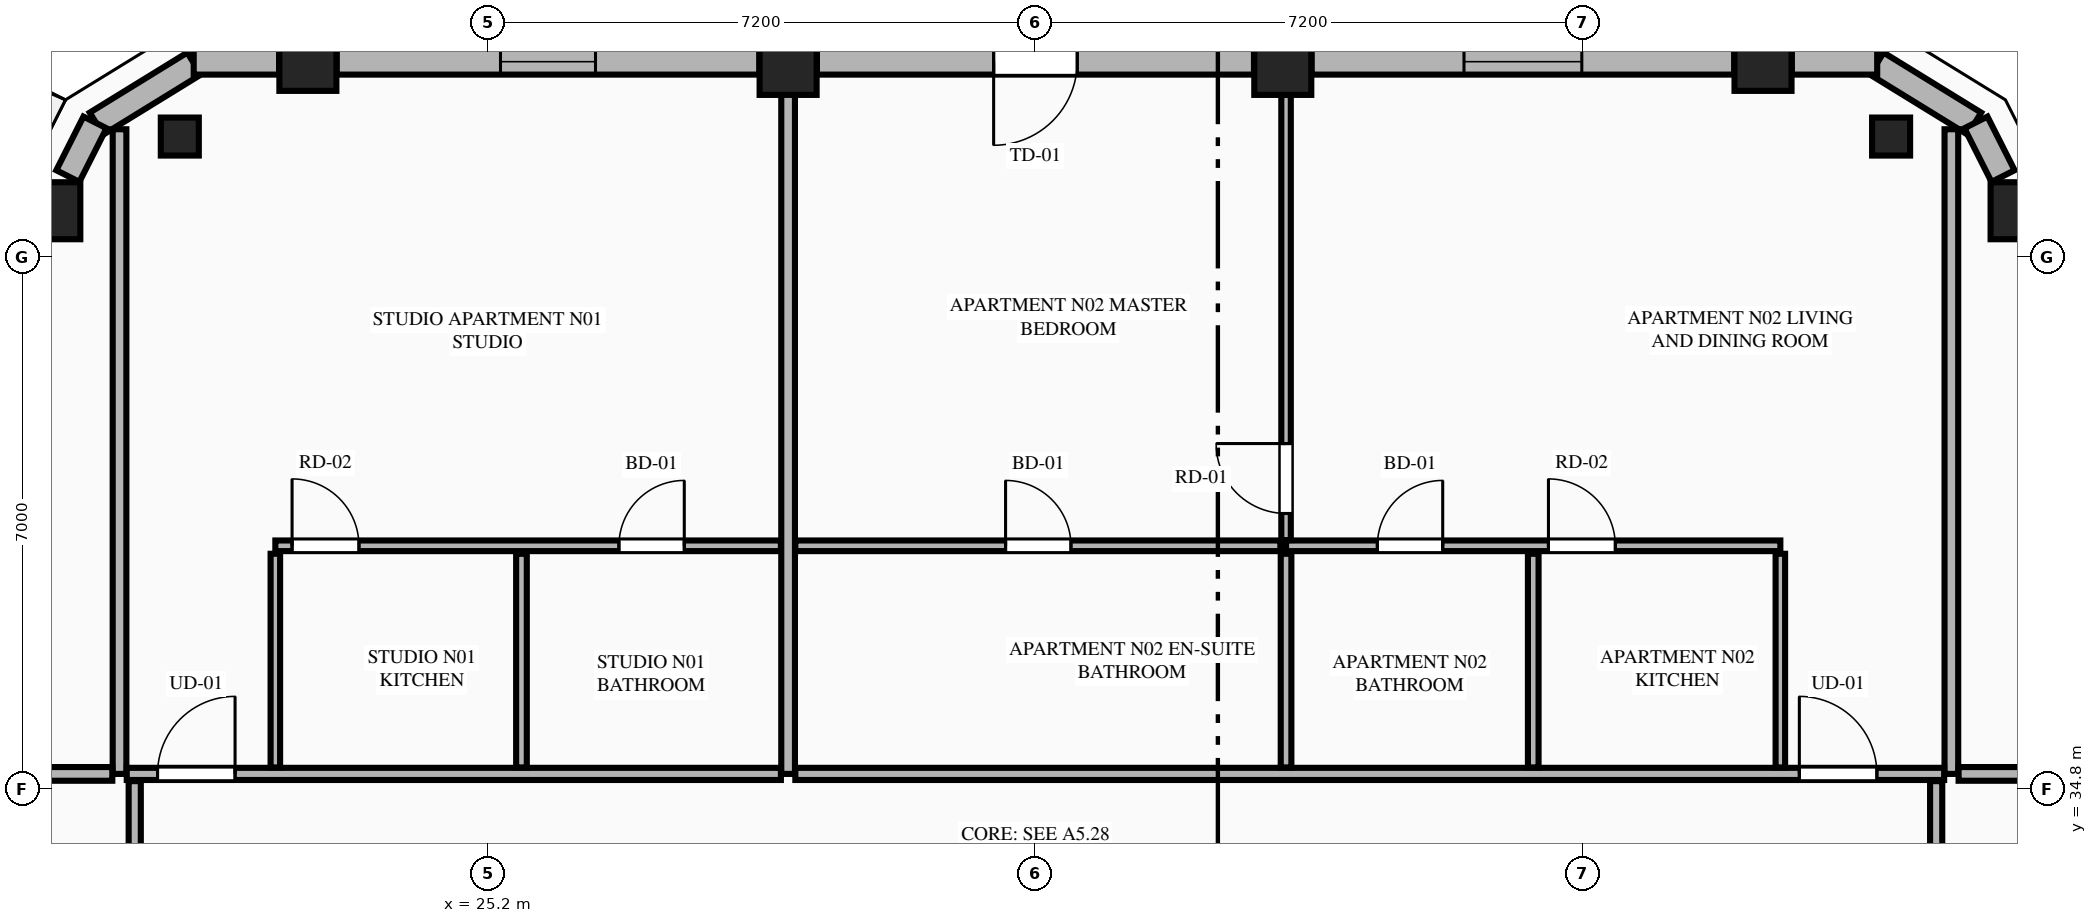
"""IFC4 building model, lengths in metres.
Left out: names, types, materials, properties, quantities, classifications, styles, units other than length and angle.
Written with IfcOpenShell. Run it as: python <this file> out.ifc"""

import sys

from ifc_helpers import new_model, si_unit, direction, frame, frame_2d, origin, origin_2d, place, context, subcontext, project, spatial, rectangle, extrude, element, fill, save


model = new_model("IFC4")
c1 = context("Model", 3, precision=1e-05, world=origin(), true_north=direction((0.0, 1.0)))
c2 = subcontext(c1, "Body", "Model", "MODEL_VIEW")
j1 = project(units=[si_unit("LENGTHUNIT", "METRE"), si_unit("PLANEANGLEUNIT", "RADIAN")], contexts=[c1])
p1 = place(None, origin())
s1 = spatial("IfcSite", under=j1, at=p1, CompositionType="ELEMENT")
p2 = place(p1, origin())
s2 = spatial("IfcBuilding", under=s1, at=p2, CompositionType="ELEMENT")
p3 = place(p2, frame((0.0, 0.0, 234.3)))
s3 = spatial("IfcBuildingStorey", under=s2, at=p3, CompositionType="ELEMENT", Elevation=234.3)
for number, where, z_axis, x_axis in (
    (1, (45.341, 42.409, 0.0), (0.0, 0.0, 1.0), (1.0, 0.0, 0.0)),
    (2, (41.972, 44.361, 0.0), (0.0, 0.0, 1.0), (1.0, 0.0, 0.0)),
    (3, (35.654, 44.308, 0.0), (0.0, 0.0, 1.0), (1.0, 0.0, 0.0)),
    (4, (29.146, 44.308, 0.0), (0.0, 0.0, 1.0), (1.0, 0.0, 0.0)),
    (5, (22.828, 44.361, 0.0), (0.0, 0.0, 1.0), (1.0, 0.0, 0.0)),
    (6, (19.459, 42.409, 0.0), (0.0, 0.0, 1.0), (1.0, 0.0, 0.0)),
):
    element("IfcColumn", number, at=place(p3, frame(where, z_axis=z_axis, x_axis=x_axis)), inside=s3, PredefinedType="COLUMN", context=c2, shape_type="SweptSolid", body=[
        extrude(rectangle(XDim=0.75, YDim=0.75, at=origin_2d()), origin(), (0.0, 0.0, 1.0), 3.65),
    ])
for number, where, z_axis, x_axis in (
    (7, (43.657, 43.385, 0.0), (0.0, 0.0, 1.0), (-0.865, 0.501, 0.0)),
    (8, (21.143, 43.385, 0.0), (0.0, 0.0, 1.0), (-0.865, -0.501, 0.0)),
):
    element("IfcColumn", number, at=place(p3, frame(where, z_axis=z_axis, x_axis=x_axis)), inside=s3, PredefinedType="PILASTER", context=c2, shape_type="SweptSolid", body=[
        extrude(rectangle(XDim=0.5, YDim=0.35, at=origin_2d()), origin(), (0.0, 0.0, 1.0), 3.65),
    ])
for number, where, z_axis, x_axis in (
    (9, (44.753, 43.555, 0.0), (0.0, 0.0, 1.0), (-0.852, 0.524, 0.0)),
    (10, (21.331, 44.345, 0.0), (0.0, 0.0, 1.0), (-0.852, -0.524, 0.0)),
):
    element("IfcWall", number, at=place(p3, frame(where, z_axis=z_axis, x_axis=x_axis)), inside=s3, PredefinedType="STANDARD", context=c2, shape_type="SweptSolid", body=[
        extrude(rectangle(XDim=1.508, YDim=0.34, at=frame_2d((0.754, 0.0))), origin(), (0.0, 0.0, 1.0), 3.45),
    ])
p4 = place(p3, frame((45.13, 42.865, 0.0), z_axis=(0.0, 0.0, 1.0), x_axis=(-0.451159191899, 0.892443490404, 0.0)))
e11 = element("IfcWall", 11, at=p4, inside=s3, PredefinedType="STANDARD", context=c2, shape_type="SweptSolid", body=[
    extrude(rectangle(XDim=0.791, YDim=0.34, at=frame_2d((0.396, 0.0))), origin(), (0.0, 0.0, 1.0), 3.45),
])
p5 = place(p3, frame((43.474, 44.37, 0.0), z_axis=(0.0, 0.0, 1.0), x_axis=(-1.0, 0.0, 0.0)))
e12 = element("IfcWall", 12, at=p5, inside=s3, PredefinedType="STANDARD", context=c2, shape_type="SweptSolid", body=[
    extrude(rectangle(XDim=1.123, YDim=0.34, at=frame_2d((0.562, 0.0))), origin(), (0.0, 0.0, 1.0), 3.45),
])
p6 = place(p3, frame((41.593, 44.37, 0.0), z_axis=(0.0, 0.0, 1.0), x_axis=(-1.0, 0.0, 0.0)))
e13 = element("IfcWall", 13, at=p6, inside=s3, PredefinedType="STANDARD", context=c2, shape_type="SweptSolid", body=[
    extrude(rectangle(XDim=5.56, YDim=0.34, at=frame_2d((2.78, 0.0))), origin(), (0.0, 0.0, 1.0), 2.983),
])
p7 = place(p6, frame((2.005, 0.0, 0.75)))
e14 = element("IfcOpeningElement", 14, at=p7, cuts=e13, PredefinedType="OPENING", context=c2, shape_type="SweptSolid", body=[
    extrude(rectangle(XDim=1.55, YDim=2.05, at=frame_2d((0.775, 1.025))), frame((0.0, 0.18, 0.0), z_axis=(0.0, -1.0, 0.0), x_axis=(1.0, 0.0, 0.0)), (0.0, 0.0, 1.0), 0.36),
])
p8 = place(p3, frame((35.275, 44.37, 0.0), z_axis=(0.0, 0.0, 1.0), x_axis=(-1.0, 0.0, 0.0)))
e15 = element("IfcWall", 15, at=p8, inside=s3, PredefinedType="STANDARD", context=c2, shape_type="SweptSolid", body=[
    extrude(rectangle(XDim=5.75, YDim=0.34, at=frame_2d((2.875, 0.0))), origin(), (0.0, 0.0, 1.0), 2.983),
])
p9 = place(p8, frame((2.325, 0.0, 0.0)))
e16 = element("IfcOpeningElement", 16, at=p9, cuts=e15, PredefinedType="OPENING", context=c2, shape_type="SweptSolid", body=[
    extrude(rectangle(XDim=1.1, YDim=2.25, at=frame_2d((0.55, 1.125))), frame((0.0, 0.18, 0.0), z_axis=(0.0, -1.0, 0.0), x_axis=(1.0, 0.0, 0.0)), (0.0, 0.0, 1.0), 0.36),
])
p10 = place(p3, frame((28.767, 44.37, 0.0), z_axis=(0.0, 0.0, 1.0), x_axis=(-1.0, 0.0, 0.0)))
e17 = element("IfcWall", 17, at=p10, inside=s3, PredefinedType="STANDARD", context=c2, shape_type="SweptSolid", body=[
    extrude(rectangle(XDim=5.56, YDim=0.34, at=frame_2d((2.78, 0.0))), origin(), (0.0, 0.0, 1.0), 2.983),
])
p11 = place(p10, frame((2.155, 0.0, 0.75)))
e18 = element("IfcOpeningElement", 18, at=p11, cuts=e17, PredefinedType="OPENING", context=c2, shape_type="SweptSolid", body=[
    extrude(rectangle(XDim=1.25, YDim=1.95, at=frame_2d((0.625, 0.975))), frame((0.0, 0.18, 0.0), z_axis=(0.0, -1.0, 0.0), x_axis=(1.0, 0.0, 0.0)), (0.0, 0.0, 1.0), 0.36),
])
p12 = place(p3, frame((22.449, 44.37, 0.0), z_axis=(0.0, 0.0, 1.0), x_axis=(-1.0, 0.0, 0.0)))
e19 = element("IfcWall", 19, at=p12, inside=s3, PredefinedType="STANDARD", context=c2, shape_type="SweptSolid", body=[
    extrude(rectangle(XDim=1.123, YDim=0.34, at=frame_2d((0.562, 0.0))), origin(), (0.0, 0.0, 1.0), 3.45),
])
p13 = place(p3, frame((20.027, 43.571, 0.0), z_axis=(0.0, 0.0, 1.0), x_axis=(-0.451404919072, -0.89231922485, 0.0)))
e20 = element("IfcWall", 20, at=p13, inside=s3, PredefinedType="STANDARD", context=c2, shape_type="SweptSolid", body=[
    extrude(rectangle(XDim=0.791, YDim=0.34, at=frame_2d((0.396, 0.0))), origin(), (0.0, 0.0, 1.0), 3.45),
])
p14 = place(p3, frame((20.35, 35.0, 0.0), z_axis=(0.0, 0.0, 1.0), x_axis=(0.0, 1.0, 0.0)))
e21 = element("IfcWall", 21, at=p14, inside=s3, PredefinedType="PARTITIONING", context=c2, shape_type="SweptSolid", body=[
    extrude(rectangle(XDim=8.481, YDim=0.18, at=frame_2d((4.24, 0.0))), origin(), (0.0, 0.0, 1.0), 3.45),
])
p15 = place(p3, frame((29.146, 35.0, 0.0), z_axis=(0.0, 0.0, 1.0), x_axis=(0.0, 1.0, 0.0)))
e22 = element("IfcWall", 22, at=p15, inside=s3, PredefinedType="PARTITIONING", context=c2, shape_type="SweptSolid", body=[
    extrude(rectangle(XDim=9.195, YDim=0.18, at=frame_2d((4.598, 0.0))), origin(), (0.0, 0.0, 1.0), 2.907),
])
p16 = place(p3, frame((44.45, 35.0, 0.0), z_axis=(0.0, 0.0, 1.0), x_axis=(0.0, 1.0, 0.0)))
e23 = element("IfcWall", 23, at=p16, inside=s3, PredefinedType="PARTITIONING", context=c2, shape_type="SweptSolid", body=[
    extrude(rectangle(XDim=8.481, YDim=0.18, at=frame_2d((4.24, 0.0))), origin(), (0.0, 0.0, 1.0), 3.45),
])
p17 = place(p3, frame((20.445, 35.0, 0.0), z_axis=(0.0, 0.0, 1.0), x_axis=(1.0, 0.0, 0.0)))
e24 = element("IfcWall", 24, at=p17, inside=s3, PredefinedType="PARTITIONING", context=c2, shape_type="SweptSolid", body=[
    extrude(rectangle(XDim=8.606, YDim=0.16, at=frame_2d((4.303, 0.0))), origin(), (0.0, 0.0, 1.0), 3.45),
])
p18 = place(p17, frame((0.405, 0.0, 0.0)))
e25 = element("IfcOpeningElement", 25, at=p18, cuts=e24, PredefinedType="OPENING", context=c2, shape_type="SweptSolid", body=[
    extrude(rectangle(XDim=1.02, YDim=2.25, at=frame_2d((0.51, 1.125))), frame((0.0, 0.09, 0.0), z_axis=(0.0, -1.0, 0.0), x_axis=(1.0, 0.0, 0.0)), (0.0, 0.0, 1.0), 0.18),
])
p19 = place(p3, frame((22.4, 35.085, 0.0), z_axis=(0.0, 0.0, 1.0), x_axis=(0.0, 1.0, 0.0)))
e26 = element("IfcWall", 26, at=p19, inside=s3, PredefinedType="PARTITIONING", context=c2, shape_type="SweptSolid", body=[
    extrude(rectangle(XDim=2.811, YDim=0.125, at=frame_2d((1.406, 0.0))), origin(), (0.0, 0.0, 1.0), 3.45),
])
p20 = place(p3, frame((22.4, 38.001, 0.0), z_axis=(0.0, 0.0, 1.0), x_axis=(1.0, 0.0, 0.0)))
e27 = element("IfcWall", 27, at=p20, inside=s3, PredefinedType="PLUMBINGWALL", context=c2, shape_type="SweptSolid", body=[
    extrude(rectangle(XDim=6.651, YDim=0.14, at=frame_2d((3.326, 0.0))), origin(), (0.0, 0.0, 1.0), 3.45),
])
p21 = place(p20, frame((4.52, 0.0, 0.0)))
e28 = element("IfcOpeningElement", 28, at=p21, cuts=e27, PredefinedType="OPENING", context=c2, shape_type="SweptSolid", body=[
    extrude(rectangle(XDim=0.86, YDim=2.1, at=frame_2d((0.43, 1.05))), frame((0.0, 0.08, 0.0), z_axis=(0.0, -1.0, 0.0), x_axis=(1.0, 0.0, 0.0)), (0.0, 0.0, 1.0), 0.16),
])
p22 = place(p20, frame((0.22, 0.0, 0.0)))
e29 = element("IfcOpeningElement", 29, at=p22, cuts=e27, PredefinedType="OPENING", context=c2, shape_type="SweptSolid", body=[
    extrude(rectangle(XDim=0.88, YDim=2.15, at=frame_2d((0.44, 1.075))), frame((0.0, 0.08, 0.0), z_axis=(0.0, -1.0, 0.0), x_axis=(1.0, 0.0, 0.0)), (0.0, 0.0, 1.0), 0.16),
])
p23 = place(p3, frame((25.638, 35.085, 0.0), z_axis=(0.0, 0.0, 1.0), x_axis=(0.0, 1.0, 0.0)))
e30 = element("IfcWall", 30, at=p23, inside=s3, PredefinedType="PLUMBINGWALL", context=c2, shape_type="SweptSolid", body=[
    extrude(rectangle(XDim=2.811, YDim=0.14, at=frame_2d((1.406, 0.0))), origin(), (0.0, 0.0, 1.0), 3.45),
])
p24 = place(p3, frame((29.241, 35.0, 0.0), z_axis=(0.0, 0.0, 1.0), x_axis=(1.0, 0.0, 0.0)))
e31 = element("IfcWall", 31, at=p24, inside=s3, PredefinedType="PARTITIONING", context=c2, shape_type="SweptSolid", body=[
    extrude(rectangle(XDim=15.114, YDim=0.16, at=frame_2d((7.557, 0.0))), origin(), (0.0, 0.0, 1.0), 3.45),
])
p25 = place(p24, frame((13.209, 0.0, 0.0)))
e32 = element("IfcOpeningElement", 32, at=p25, cuts=e31, PredefinedType="OPENING", context=c2, shape_type="SweptSolid", body=[
    extrude(rectangle(XDim=1.02, YDim=2.25, at=frame_2d((0.51, 1.125))), frame((0.0, 0.09, 0.0), z_axis=(0.0, -1.0, 0.0), x_axis=(1.0, 0.0, 0.0)), (0.0, 0.0, 1.0), 0.18),
])
p26 = place(p3, frame((42.2, 35.085, 0.0), z_axis=(0.0, 0.0, 1.0), x_axis=(0.0, 1.0, 0.0)))
e33 = element("IfcWall", 33, at=p26, inside=s3, PredefinedType="PARTITIONING", context=c2, shape_type="SweptSolid", body=[
    extrude(rectangle(XDim=2.811, YDim=0.125, at=frame_2d((1.406, 0.0))), origin(), (0.0, 0.0, 1.0), 3.45),
])
p27 = place(p3, frame((35.697, 38.001, 0.0), z_axis=(0.0, 0.0, 1.0), x_axis=(1.0, 0.0, 0.0)))
e34 = element("IfcWall", 34, at=p27, inside=s3, PredefinedType="PLUMBINGWALL", context=c2, shape_type="SweptSolid", body=[
    extrude(rectangle(XDim=6.503, YDim=0.14, at=frame_2d((3.251, 0.0))), origin(), (0.0, 0.0, 1.0), 3.45),
])
p28 = place(p27, frame((1.201, 0.0, 0.0)))
e35 = element("IfcOpeningElement", 35, at=p28, cuts=e34, PredefinedType="OPENING", context=c2, shape_type="SweptSolid", body=[
    extrude(rectangle(XDim=0.86, YDim=2.1, at=frame_2d((0.43, 1.05))), frame((0.0, 0.08, 0.0), z_axis=(0.0, -1.0, 0.0), x_axis=(1.0, 0.0, 0.0)), (0.0, 0.0, 1.0), 0.16),
])
p29 = place(p27, frame((3.452, 0.0, 0.0)))
e36 = element("IfcOpeningElement", 36, at=p29, cuts=e34, PredefinedType="OPENING", context=c2, shape_type="SweptSolid", body=[
    extrude(rectangle(XDim=0.88, YDim=2.15, at=frame_2d((0.44, 1.075))), frame((0.0, 0.08, 0.0), z_axis=(0.0, -1.0, 0.0), x_axis=(1.0, 0.0, 0.0)), (0.0, 0.0, 1.0), 0.16),
])
p30 = place(p3, frame((29.241, 38.001, 0.0), z_axis=(0.0, 0.0, 1.0), x_axis=(1.0, 0.0, 0.0)))
e37 = element("IfcWall", 37, at=p30, inside=s3, PredefinedType="PLUMBINGWALL", context=c2, shape_type="SweptSolid", body=[
    extrude(rectangle(XDim=6.381, YDim=0.14, at=frame_2d((3.19, 0.0))), origin(), (0.0, 0.0, 1.0), 3.45),
])
p31 = place(p30, frame((2.766, 0.0, 0.0)))
e38 = element("IfcOpeningElement", 38, at=p31, cuts=e37, PredefinedType="OPENING", context=c2, shape_type="SweptSolid", body=[
    extrude(rectangle(XDim=0.86, YDim=2.1, at=frame_2d((0.43, 1.05))), frame((0.0, 0.08, 0.0), z_axis=(0.0, -1.0, 0.0), x_axis=(1.0, 0.0, 0.0)), (0.0, 0.0, 1.0), 0.16),
])
p32 = place(p3, frame((38.949, 35.085, 0.0), z_axis=(0.0, 0.0, 1.0), x_axis=(0.0, 1.0, 0.0)))
e39 = element("IfcWall", 39, at=p32, inside=s3, PredefinedType="PLUMBINGWALL", context=c2, shape_type="SweptSolid", body=[
    extrude(rectangle(XDim=2.811, YDim=0.14, at=frame_2d((1.406, 0.0))), origin(), (0.0, 0.0, 1.0), 3.45),
])
p33 = place(p3, frame((35.697, 35.085, 0.0), z_axis=(0.0, 0.0, 1.0), x_axis=(0.0, 1.0, 0.0)))
e40 = element("IfcWall", 40, at=p33, inside=s3, PredefinedType="PLUMBINGWALL", context=c2, shape_type="SweptSolid", body=[
    extrude(rectangle(XDim=2.811, YDim=0.14, at=frame_2d((1.406, 0.0))), origin(), (0.0, 0.0, 1.0), 2.907),
])
p34 = place(p3, frame((35.697, 38.076, 0.0), z_axis=(0.0, 0.0, 1.0), x_axis=(0.0, 1.0, 0.0)))
e41 = element("IfcWall", 41, at=p34, inside=s3, PredefinedType="PARTITIONING", context=c2, shape_type="SweptSolid", body=[
    extrude(rectangle(XDim=6.209, YDim=0.125, at=frame_2d((3.104, 0.0))), origin(), (0.0, 0.0, 1.0), 2.907),
])
p35 = place(p34, frame((0.35, 0.0, 0.0)))
e42 = element("IfcOpeningElement", 42, at=p35, cuts=e41, PredefinedType="OPENING", context=c2, shape_type="SweptSolid", body=[
    extrude(rectangle(XDim=0.92, YDim=2.15, at=frame_2d((0.46, 1.075))), frame((0.0, 0.073, 0.0), z_axis=(0.0, -1.0, 0.0), x_axis=(1.0, 0.0, 0.0)), (0.0, 0.0, 1.0), 0.145),
])
p36 = place(p3, frame((15.933, 35.0, 0.0), z_axis=(0.0, 0.0, 1.0), x_axis=(1.0, 0.0, 0.0)))
e43 = element("IfcWall", 43, at=p36, inside=s3, PredefinedType="PARTITIONING", context=c2, shape_type="SweptSolid", body=[
    extrude(rectangle(XDim=4.322, YDim=0.18, at=frame_2d((2.161, 0.0))), origin(), (0.0, 0.0, 1.0), 3.45),
])
p37 = place(p3, frame((44.545, 35.0, 0.0), z_axis=(0.0, 0.0, 1.0), x_axis=(1.0, 0.0, 0.0)))
e44 = element("IfcWall", 44, at=p37, inside=s3, PredefinedType="PARTITIONING", context=c2, shape_type="SweptSolid", body=[
    extrude(rectangle(XDim=4.322, YDim=0.18, at=frame_2d((2.161, 0.0))), origin(), (0.0, 0.0, 1.0), 3.45),
])
p38 = place(p3, frame((20.55, 16.495, 0.0), z_axis=(0.0, 0.0, 1.0), x_axis=(0.0, 1.0, 0.0)))
e45 = element("IfcWall", 45, at=p38, inside=s3, PredefinedType="PARTITIONING", context=c2, shape_type="SweptSolid", body=[
    extrude(rectangle(XDim=18.41, YDim=0.16, at=frame_2d((9.205, 0.0))), origin(), (0.0, 0.0, 1.0), 3.137),
])
p39 = place(p38, frame((0.45, 0.0, 0.0)))
e46 = element("IfcOpeningElement", 46, at=p39, cuts=e45, PredefinedType="OPENING", context=c2, shape_type="SweptSolid", body=[
    extrude(rectangle(XDim=1.02, YDim=2.25, at=frame_2d((0.51, 1.125))), frame((0.0, 0.09, 0.0), z_axis=(0.0, -1.0, 0.0), x_axis=(1.0, 0.0, 0.0)), (0.0, 0.0, 1.0), 0.18),
])
p40 = place(p3, frame((44.25, 16.495, 0.0), z_axis=(0.0, 0.0, 1.0), x_axis=(0.0, 1.0, 0.0)))
e47 = element("IfcWall", 47, at=p40, inside=s3, PredefinedType="PARTITIONING", context=c2, shape_type="SweptSolid", body=[
    extrude(rectangle(XDim=18.41, YDim=0.16, at=frame_2d((9.205, 0.0))), origin(), (0.0, 0.0, 1.0), 3.137),
])
p41 = place(p40, frame((0.45, 0.0, 0.0)))
e48 = element("IfcOpeningElement", 48, at=p41, cuts=e47, PredefinedType="OPENING", context=c2, shape_type="SweptSolid", body=[
    extrude(rectangle(XDim=1.02, YDim=2.25, at=frame_2d((0.51, 1.125))), frame((0.0, 0.09, 0.0), z_axis=(0.0, -1.0, 0.0), x_axis=(1.0, 0.0, 0.0)), (0.0, 0.0, 1.0), 0.18),
])
p42 = place(p7, origin())
e49 = element("IfcWindow", 49, at=p42, inside=s3, PartitioningType="SINGLE_PANEL", PredefinedType="WINDOW", context=c2, shape_type="SweptSolid", body=[
    extrude(rectangle(XDim=1.55, YDim=2.05, at=frame_2d((0.775, 1.025))), frame((0.0, 0.03, 0.0), z_axis=(0.0, -1.0, 0.0), x_axis=(1.0, 0.0, 0.0)), (0.0, 0.0, 1.0), 0.06),
])
fill(e14, e49)
p43 = place(p9, origin())
e50 = element("IfcDoor", 50, at=p43, inside=s3, OperationType="SINGLE_SWING_RIGHT", PredefinedType="DOOR", context=c2, shape_type="SweptSolid", body=[
    extrude(rectangle(XDim=1.1, YDim=2.25, at=frame_2d((0.55, 1.125))), frame((0.0, 0.025, 0.0), z_axis=(0.0, -1.0, 0.0), x_axis=(1.0, 0.0, 0.0)), (0.0, 0.0, 1.0), 0.05),
])
fill(e16, e50)
p44 = place(p11, origin())
e51 = element("IfcWindow", 51, at=p44, inside=s3, PartitioningType="SINGLE_PANEL", PredefinedType="WINDOW", context=c2, shape_type="SweptSolid", body=[
    extrude(rectangle(XDim=1.25, YDim=1.95, at=frame_2d((0.625, 0.975))), frame((0.0, 0.03, 0.0), z_axis=(0.0, -1.0, 0.0), x_axis=(1.0, 0.0, 0.0)), (0.0, 0.0, 1.0), 0.06),
])
fill(e18, e51)
p45 = place(p21, origin())
e52 = element("IfcDoor", 52, at=p45, inside=s3, OperationType="SINGLE_SWING_RIGHT", PredefinedType="DOOR", context=c2, shape_type="SweptSolid", body=[
    extrude(rectangle(XDim=0.86, YDim=2.1, at=frame_2d((0.43, 1.05))), frame((0.0, 0.025, 0.0), z_axis=(0.0, -1.0, 0.0), x_axis=(1.0, 0.0, 0.0)), (0.0, 0.0, 1.0), 0.05),
])
fill(e28, e52)
p46 = place(p18, origin())
e53 = element("IfcDoor", 53, at=p46, inside=s3, OperationType="SINGLE_SWING_RIGHT", PredefinedType="DOOR", context=c2, shape_type="SweptSolid", body=[
    extrude(rectangle(XDim=1.02, YDim=2.25, at=frame_2d((0.51, 1.125))), frame((0.0, 0.025, 0.0), z_axis=(0.0, -1.0, 0.0), x_axis=(1.0, 0.0, 0.0)), (0.0, 0.0, 1.0), 0.05),
])
fill(e25, e53)
p47 = place(p22, origin())
e54 = element("IfcDoor", 54, at=p47, inside=s3, OperationType="SINGLE_SWING_LEFT", PredefinedType="DOOR", context=c2, shape_type="SweptSolid", body=[
    extrude(rectangle(XDim=0.88, YDim=2.15, at=frame_2d((0.44, 1.075))), frame((0.0, 0.025, 0.0), z_axis=(0.0, -1.0, 0.0), x_axis=(1.0, 0.0, 0.0)), (0.0, 0.0, 1.0), 0.05),
])
fill(e29, e54)
p48 = place(p28, origin())
e55 = element("IfcDoor", 55, at=p48, inside=s3, OperationType="SINGLE_SWING_RIGHT", PredefinedType="DOOR", context=c2, shape_type="SweptSolid", body=[
    extrude(rectangle(XDim=0.86, YDim=2.1, at=frame_2d((0.43, 1.05))), frame((0.0, 0.025, 0.0), z_axis=(0.0, -1.0, 0.0), x_axis=(1.0, 0.0, 0.0)), (0.0, 0.0, 1.0), 0.05),
])
fill(e35, e55)
p49 = place(p31, origin())
e56 = element("IfcDoor", 56, at=p49, inside=s3, OperationType="SINGLE_SWING_LEFT", PredefinedType="DOOR", context=c2, shape_type="SweptSolid", body=[
    extrude(rectangle(XDim=0.86, YDim=2.1, at=frame_2d((0.43, 1.05))), frame((0.0, 0.025, 0.0), z_axis=(0.0, -1.0, 0.0), x_axis=(1.0, 0.0, 0.0)), (0.0, 0.0, 1.0), 0.05),
])
fill(e38, e56)
p50 = place(p25, origin())
e57 = element("IfcDoor", 57, at=p50, inside=s3, OperationType="SINGLE_SWING_LEFT", PredefinedType="DOOR", context=c2, shape_type="SweptSolid", body=[
    extrude(rectangle(XDim=1.02, YDim=2.25, at=frame_2d((0.51, 1.125))), frame((0.0, 0.025, 0.0), z_axis=(0.0, -1.0, 0.0), x_axis=(1.0, 0.0, 0.0)), (0.0, 0.0, 1.0), 0.05),
])
fill(e32, e57)
p51 = place(p29, origin())
e58 = element("IfcDoor", 58, at=p51, inside=s3, OperationType="SINGLE_SWING_LEFT", PredefinedType="DOOR", context=c2, shape_type="SweptSolid", body=[
    extrude(rectangle(XDim=0.88, YDim=2.15, at=frame_2d((0.44, 1.075))), frame((0.0, 0.025, 0.0), z_axis=(0.0, -1.0, 0.0), x_axis=(1.0, 0.0, 0.0)), (0.0, 0.0, 1.0), 0.05),
])
fill(e36, e58)
p52 = place(p35, origin())
e59 = element("IfcDoor", 59, at=p52, inside=s3, OperationType="SINGLE_SWING_RIGHT", PredefinedType="DOOR", context=c2, shape_type="SweptSolid", body=[
    extrude(rectangle(XDim=0.92, YDim=2.15, at=frame_2d((0.46, 1.075))), frame((0.0, 0.025, 0.0), z_axis=(0.0, -1.0, 0.0), x_axis=(1.0, 0.0, 0.0)), (0.0, 0.0, 1.0), 0.05),
])
fill(e42, e59)
save(model, sys.argv[1])
